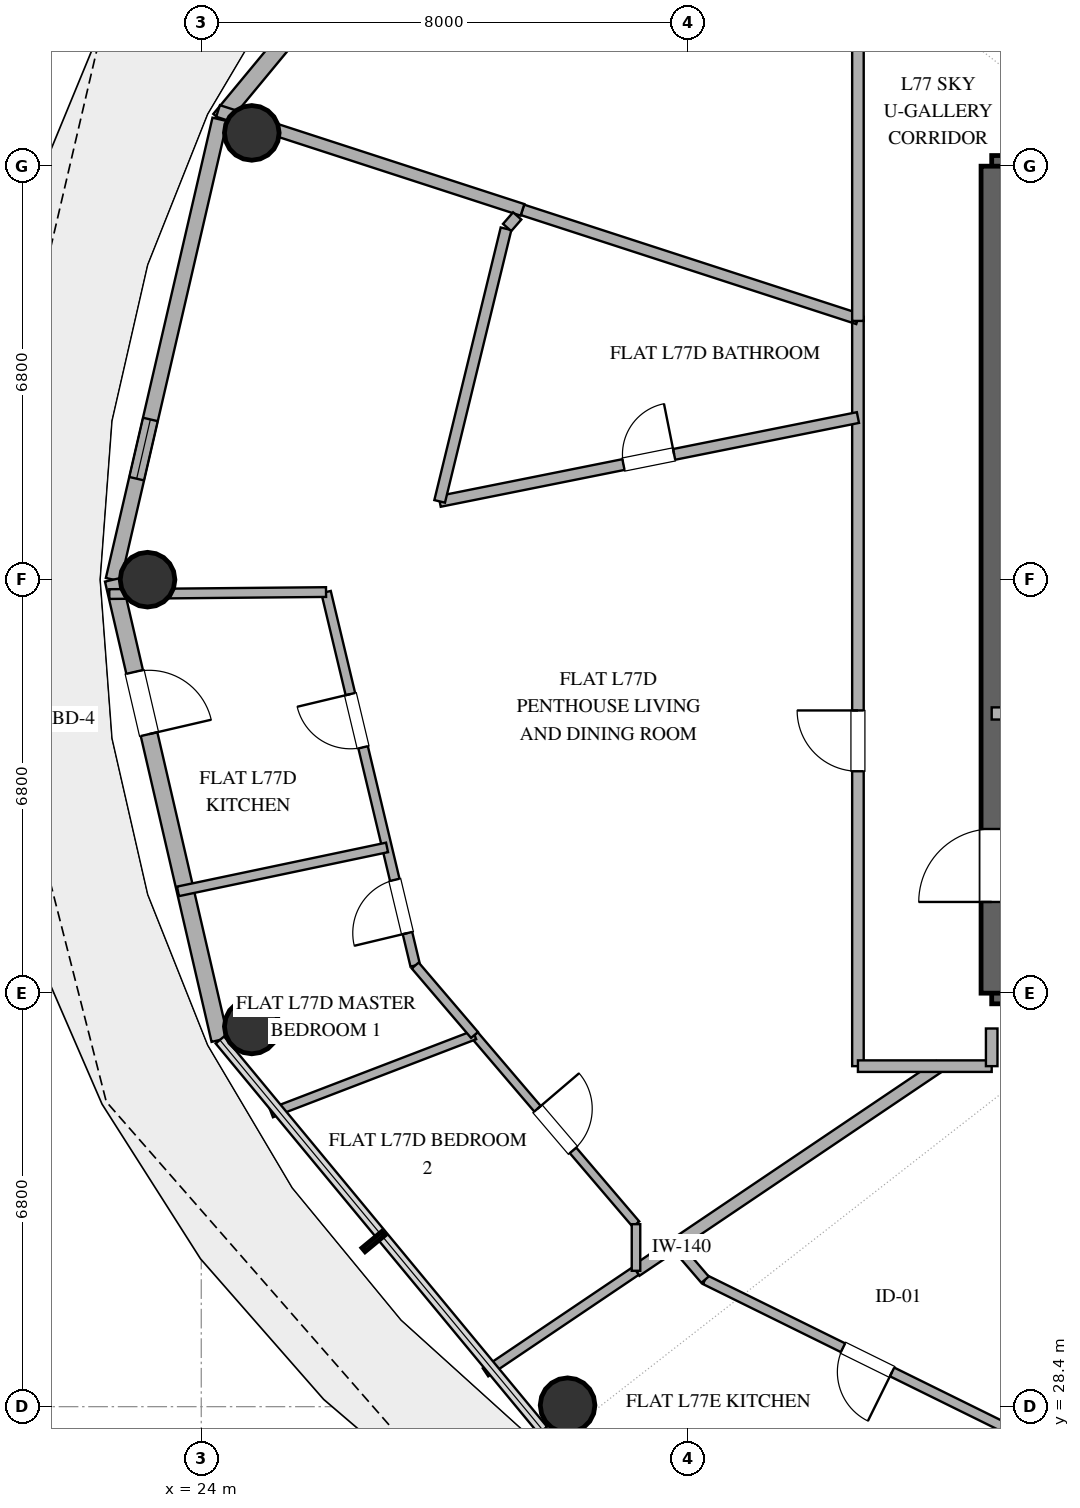
"""IFC4 building model, lengths in metres.
Left out: names, types, materials, properties, quantities, classifications, styles, units other than length and angle.
Written with IfcOpenShell. Run it as: python <this file> out.ifc"""

import sys

from ifc_helpers import new_model, si_unit, direction, frame, frame_2d, origin, origin_2d, place, context, subcontext, project, spatial, rectangle, hollow_circle, extrude, element, fill, save


model = new_model("IFC4")
c1 = context("Model", 3, precision=1e-05, world=origin(), true_north=direction((0.0, 1.0)))
c2 = subcontext(c1, "Body", "Model", "MODEL_VIEW")
j1 = project(units=[si_unit("LENGTHUNIT", "METRE"), si_unit("PLANEANGLEUNIT", "RADIAN")], contexts=[c1])
p1 = place(None, origin())
s1 = spatial("IfcSite", under=j1, at=p1, CompositionType="ELEMENT")
p2 = place(p1, origin())
s2 = spatial("IfcBuilding", under=s1, at=p2, CompositionType="ELEMENT")
p3 = place(p2, frame((0.0, 0.0, 298.2)))
s3 = spatial("IfcBuildingStorey", under=s2, at=p3, CompositionType="ELEMENT", Elevation=298.2)
for number, where, z_axis, x_axis in (
    (1, (37.0, 35.2, 0.0), (0.0, 0.0, 1.0), (1.0, 0.0, 0.0)),
    (2, (37.0, 48.8, 0.0), (0.0, 0.0, 1.0), (1.0, 0.0, 0.0)),
):
    element("IfcWall", number, at=place(p3, frame(where, z_axis=z_axis, x_axis=x_axis)), inside=s3, PredefinedType="SHEAR", context=c2, shape_type="SweptSolid", body=[
        extrude(rectangle(XDim=4.0, YDim=0.35, at=frame_2d((2.0, 0.0))), origin(), (0.0, 0.0, 1.0), 3.37),
    ])
p4 = place(p3, frame((37.0, 35.2, 0.0), z_axis=(0.0, 0.0, 1.0), x_axis=(0.0, 1.0, 0.0)))
e3 = element("IfcWall", 3, at=p4, inside=s3, PredefinedType="SHEAR", context=c2, shape_type="SweptSolid", body=[
    extrude(rectangle(XDim=13.6, YDim=0.35, at=frame_2d((6.8, 0.0))), origin(), (0.0, 0.0, 1.0), 3.37),
])
p5 = place(p4, frame((1.5, 0.0, 0.0)))
e4 = element("IfcOpeningElement", 4, at=p5, cuts=e3, PredefinedType="OPENING", context=c2, shape_type="SweptSolid", body=[
    extrude(rectangle(XDim=1.2, YDim=2.15, at=frame_2d((0.6, 1.075))), frame((0.0, 0.185, 0.0), z_axis=(0.0, -1.0, 0.0), x_axis=(1.0, 0.0, 0.0)), (0.0, 0.0, 1.0), 0.37),
])
for number, where, z_axis, x_axis in (
    (5, (24.831, 49.347, 0.0), (0.0, 0.0, 1.0), (1.0, 0.0, 0.0)),
    (6, (23.117, 42.0, 0.0), (0.0, 0.0, 1.0), (1.0, 0.0, 0.0)),
    (7, (24.831, 34.653, 0.0), (0.0, 0.0, 1.0), (1.0, 0.0, 0.0)),
    (8, (30.025, 28.424, 0.0), (0.0, 0.0, 1.0), (1.0, 0.0, 0.0)),
):
    element("IfcColumn", number, at=place(p3, frame(where, z_axis=z_axis, x_axis=x_axis)), inside=s3, PredefinedType="COLUMN", context=c2, shape_type="SweptSolid", body=[
        extrude(hollow_circle(Radius=0.45, WallThickness=0.025, at=origin_2d()), origin(), (0.0, 0.0, 1.0), 3.37),
    ])
p6 = place(p3, frame((29.617, 55.987, 0.0), z_axis=(0.0, 0.0, 1.0), x_axis=(-0.63761509934, -0.770355103243, 0.0)))
e9 = element("IfcWall", 9, at=p6, inside=s3, PredefinedType="SOLIDWALL", context=c2, shape_type="SweptSolid", body=[
    extrude(rectangle(XDim=8.33, YDim=0.28, at=frame_2d((4.165, 0.0))), origin(), (0.0, 0.0, 1.0), 3.37),
])
p7 = place(p6, frame((2.226, 0.0, 0.85)))
e10 = element("IfcOpeningElement", 10, at=p7, cuts=e9, PredefinedType="OPENING", context=c2, shape_type="SweptSolid", body=[
    extrude(rectangle(XDim=1.5, YDim=1.8, at=frame_2d((0.75, 0.9))), frame((0.0, 0.15, 0.0), z_axis=(0.0, -1.0, 0.0), x_axis=(1.0, 0.0, 0.0)), (0.0, 0.0, 1.0), 0.3),
])
p8 = place(p6, frame((4.496, 0.0, 0.85)))
e11 = element("IfcOpeningElement", 11, at=p8, cuts=e9, PredefinedType="OPENING", context=c2, shape_type="SweptSolid", body=[
    extrude(rectangle(XDim=1.5, YDim=1.8, at=frame_2d((0.75, 0.9))), frame((0.0, 0.15, 0.0), z_axis=(0.0, -1.0, 0.0), x_axis=(1.0, 0.0, 0.0)), (0.0, 0.0, 1.0), 0.3),
])
p9 = place(p3, frame((24.306, 49.57, 0.0), z_axis=(0.0, 0.0, 1.0), x_axis=(-0.225635078214, -0.974211892495, 0.0)))
e12 = element("IfcWall", 12, at=p9, inside=s3, PredefinedType="SOLIDWALL", context=c2, shape_type="SweptSolid", body=[
    extrude(rectangle(XDim=7.77, YDim=0.25, at=frame_2d((3.885, 0.0))), origin(), (0.0, 0.0, 1.0), 3.37),
])
p10 = place(p9, frame((5.065, 0.0, 1.42)))
e13 = element("IfcOpeningElement", 13, at=p10, cuts=e12, PredefinedType="OPENING", context=c2, shape_type="SweptSolid", body=[
    extrude(rectangle(XDim=1.0, YDim=1.05, at=frame_2d((0.5, 0.525))), frame((0.0, 0.135, 0.0), z_axis=(0.0, -1.0, 0.0), x_axis=(1.0, 0.0, 0.0)), (0.0, 0.0, 1.0), 0.27),
])
p11 = place(p3, frame((22.553, 42.0, 0.0), z_axis=(0.0, 0.0, 1.0), x_axis=(0.225635078214, -0.974211892495, 0.0)))
e14 = element("IfcWall", 14, at=p11, inside=s3, PredefinedType="SOLIDWALL", context=c2, shape_type="SweptSolid", body=[
    extrude(rectangle(XDim=7.77, YDim=0.28, at=frame_2d((3.885, 0.0))), origin(), (0.0, 0.0, 1.0), 3.37),
])
p12 = place(p11, frame((1.557, 0.0, 0.0)))
e15 = element("IfcOpeningElement", 15, at=p12, cuts=e14, PredefinedType="OPENING", context=c2, shape_type="SweptSolid", body=[
    extrude(rectangle(XDim=1.05, YDim=2.2, at=frame_2d((0.525, 1.1))), frame((0.0, 0.15, 0.0), z_axis=(0.0, -1.0, 0.0), x_axis=(1.0, 0.0, 0.0)), (0.0, 0.0, 1.0), 0.3),
])
p13 = place(p3, frame((29.617, 28.013, 0.0), z_axis=(0.0, 0.0, 1.0), x_axis=(0.890007394051, -0.455946091699, 0.0)))
e16 = element("IfcWall", 16, at=p13, inside=s3, PredefinedType="SOLIDWALL", context=c2, shape_type="SweptSolid", body=[
    extrude(rectangle(XDim=9.404, YDim=0.28, at=frame_2d((4.702, 0.0))), origin(), (0.0, 0.0, 1.0), 3.37),
])
p14 = place(p13, frame((2.924, 0.0, 0.85)))
e17 = element("IfcOpeningElement", 17, at=p14, cuts=e16, PredefinedType="OPENING", context=c2, shape_type="SweptSolid", body=[
    extrude(rectangle(XDim=2.1, YDim=2.2, at=frame_2d((1.05, 1.1))), frame((0.0, 0.15, 0.0), z_axis=(0.0, -1.0, 0.0), x_axis=(1.0, 0.0, 0.0)), (0.0, 0.0, 1.0), 0.3),
])
p15 = place(p13, frame((6.915, 0.0, 0.85)))
e18 = element("IfcOpeningElement", 18, at=p15, cuts=e16, PredefinedType="OPENING", context=c2, shape_type="SweptSolid", body=[
    extrude(rectangle(XDim=1.0, YDim=1.8, at=frame_2d((0.5, 0.9))), frame((0.0, 0.15, 0.0), z_axis=(0.0, -1.0, 0.0), x_axis=(1.0, 0.0, 0.0)), (0.0, 0.0, 1.0), 0.3),
])
p16 = place(p3, frame((37.0, 39.8, 0.0), z_axis=(0.0, 0.0, 1.0), x_axis=(1.0, 0.0, 0.0)))
e19 = element("IfcWall", 19, at=p16, inside=s3, PredefinedType="SOLIDWALL", context=c2, shape_type="SweptSolid", body=[
    extrude(rectangle(XDim=4.0, YDim=0.2, at=frame_2d((2.0, 0.0))), origin(), (0.0, 0.0, 1.0), 2.73),
])
p17 = place(p16, frame((1.45, 0.0, 0.0)))
e20 = element("IfcOpeningElement", 20, at=p17, cuts=e19, PredefinedType="OPENING", context=c2, shape_type="SweptSolid", body=[
    extrude(rectangle(XDim=1.1, YDim=2.15, at=frame_2d((0.55, 1.075))), frame((0.0, 0.11, 0.0), z_axis=(0.0, -1.0, 0.0), x_axis=(1.0, 0.0, 0.0)), (0.0, 0.0, 1.0), 0.22),
])
p18 = place(p3, frame((34.8, 34.0, 0.0), z_axis=(0.0, 0.0, 1.0), x_axis=(0.0, 1.0, 0.0)))
e21 = element("IfcWall", 21, at=p18, inside=s3, PredefinedType="PARTITIONING", context=c2, shape_type="SweptSolid", body=[
    extrude(rectangle(XDim=12.323, YDim=0.19, at=frame_2d((6.161, 0.0))), origin(), (0.0, 0.0, 1.0), 2.73),
])
p19 = place(p18, frame((4.849, 0.0, 0.0)))
e22 = element("IfcOpeningElement", 22, at=p19, cuts=e21, PredefinedType="OPENING", context=c2, shape_type="SweptSolid", body=[
    extrude(rectangle(XDim=1.0, YDim=2.2, at=frame_2d((0.5, 1.1))), frame((0.0, 0.105, 0.0), z_axis=(0.0, -1.0, 0.0), x_axis=(1.0, 0.0, 0.0)), (0.0, 0.0, 1.0), 0.21),
])
p20 = place(p3, frame((27.921, 43.288, 0.0), z_axis=(0.0, 0.0, 1.0), x_axis=(0.980509676699, 0.196470796559, 0.0)))
e23 = element("IfcWall", 23, at=p20, inside=s3, PredefinedType="PLUMBINGWALL", context=c2, shape_type="SweptSolid", body=[
    extrude(rectangle(XDim=7.016, YDim=0.18, at=frame_2d((3.508, 0.0))), origin(), (0.0, 0.0, 1.0), 2.73),
])
p21 = place(p20, frame((3.083, 0.0, 0.0)))
e24 = element("IfcOpeningElement", 24, at=p21, cuts=e23, PredefinedType="OPENING", context=c2, shape_type="SweptSolid", body=[
    extrude(rectangle(XDim=0.85, YDim=2.1, at=frame_2d((0.425, 1.05))), frame((0.0, 0.1, 0.0), z_axis=(0.0, -1.0, 0.0), x_axis=(1.0, 0.0, 0.0)), (0.0, 0.0, 1.0), 0.2),
])
p22 = place(p3, frame((37.63, 27.852, 0.0), z_axis=(0.0, 0.0, 1.0), x_axis=(-0.896847493932, 0.442339883605, 0.0)))
e25 = element("IfcWall", 25, at=p22, inside=s3, PredefinedType="PLUMBINGWALL", context=c2, shape_type="SweptSolid", body=[
    extrude(rectangle(XDim=5.959, YDim=0.16, at=frame_2d((2.979, 0.0))), origin(), (0.0, 0.0, 1.0), 2.73),
])
p23 = place(p22, frame((2.53, 0.0, 0.0)))
e26 = element("IfcOpeningElement", 26, at=p23, cuts=e25, PredefinedType="OPENING", context=c2, shape_type="SweptSolid", body=[
    extrude(rectangle(XDim=0.9, YDim=2.1, at=frame_2d((0.45, 1.05))), frame((0.0, 0.09, 0.0), z_axis=(0.0, -1.0, 0.0), x_axis=(1.0, 0.0, 0.0)), (0.0, 0.0, 1.0), 0.18),
])
p24 = place(p3, frame((29.283, 48.082, 0.0), z_axis=(0.0, 0.0, 1.0), x_axis=(0.951054787399, -0.309022315318, 0.0)))
e27 = element("IfcWall", 27, at=p24, inside=s3, PredefinedType="PLUMBINGWALL", context=c2, shape_type="SweptSolid", body=[
    extrude(rectangle(XDim=5.801, YDim=0.18, at=frame_2d((2.901, 0.0))), origin(), (0.0, 0.0, 1.0), 2.73),
])
p25 = place(p3, frame((24.276, 49.708, 0.0), z_axis=(0.0, 0.0, 1.0), x_axis=(0.95105383501, -0.3090252464, 0.0)))
e28 = element("IfcWall", 28, at=p25, inside=s3, PredefinedType="PARTITIONING", context=c2, shape_type="SweptSolid", body=[
    extrude(rectangle(XDim=5.264, YDim=0.2, at=frame_2d((2.632, 0.0))), origin(), (0.0, 0.0, 1.0), 2.73),
])
p26 = place(p3, frame((31.15, 30.635, 0.0), z_axis=(0.0, 0.0, 1.0), x_axis=(0.829036266652, 0.559194839546, 0.0)))
e29 = element("IfcWall", 29, at=p26, inside=s3, PredefinedType="PARTITIONING", context=c2, shape_type="SweptSolid", body=[
    extrude(rectangle(XDim=6.019, YDim=0.2, at=frame_2d((3.009, 0.0))), origin(), (0.0, 0.0, 1.0), 2.73),
])
p27 = place(p3, frame((34.8, 46.255, 0.0), z_axis=(0.0, 0.0, 1.0), x_axis=(0.0, 1.0, 0.0)))
e30 = element("IfcWall", 30, at=p27, inside=s3, PredefinedType="PARTITIONING", context=c2, shape_type="SweptSolid", body=[
    extrude(rectangle(XDim=4.645, YDim=0.19, at=frame_2d((2.322, 0.0))), origin(), (0.0, 0.0, 1.0), 2.73),
])
p28 = place(p3, frame((29.012, 47.771, 0.0), z_axis=(0.0, 0.0, 1.0), x_axis=(-0.236555437191, -0.971617993419, 0.0)))
e31 = element("IfcWall", 31, at=p28, inside=s3, PredefinedType="PLUMBINGWALL", context=c2, shape_type="SweptSolid", body=[
    extrude(rectangle(XDim=4.614, YDim=0.18, at=frame_2d((2.307, 0.0))), origin(), (0.0, 0.0, 1.0), 2.73),
])
p29 = place(p3, frame((27.519, 35.655, 0.0), z_axis=(0.0, 0.0, 1.0), x_axis=(-0.232313993087, 0.97264084256, 0.0)))
e32 = element("IfcWall", 32, at=p29, inside=s3, PredefinedType="PLUMBINGWALL", context=c2, shape_type="SweptSolid", body=[
    extrude(rectangle(XDim=6.314, YDim=0.16, at=frame_2d((3.157, 0.0))), origin(), (0.0, 0.0, 1.0), 2.73),
])
p30 = place(p29, frame((3.689, 0.0, 0.0)))
e33 = element("IfcOpeningElement", 33, at=p30, cuts=e32, PredefinedType="OPENING", context=c2, shape_type="SweptSolid", body=[
    extrude(rectangle(XDim=0.9, YDim=2.1, at=frame_2d((0.45, 1.05))), frame((0.0, 0.09, 0.0), z_axis=(0.0, -1.0, 0.0), x_axis=(1.0, 0.0, 0.0)), (0.0, 0.0, 1.0), 0.18),
])
p31 = place(p29, frame((0.548, 0.0, 0.0)))
e34 = element("IfcOpeningElement", 34, at=p31, cuts=e32, PredefinedType="OPENING", context=c2, shape_type="SweptSolid", body=[
    extrude(rectangle(XDim=0.9, YDim=2.1, at=frame_2d((0.45, 1.05))), frame((0.0, 0.09, 0.0), z_axis=(0.0, -1.0, 0.0), x_axis=(1.0, 0.0, 0.0)), (0.0, 0.0, 1.0), 0.18),
])
p32 = place(p3, frame((28.494, 34.512, 0.0), z_axis=(0.0, 0.0, 1.0), x_axis=(0.649192484668, -0.760624163336, 0.0)))
e35 = element("IfcWall", 35, at=p32, inside=s3, PredefinedType="PARTITIONING", context=c2, shape_type="SweptSolid", body=[
    extrude(rectangle(XDim=4.091, YDim=0.14, at=frame_2d((2.045, 0.0))), origin(), (0.0, 0.0, 1.0), 2.73),
])
p33 = place(p32, frame((1.595, 0.0, 0.0)))
e36 = element("IfcOpeningElement", 36, at=p33, cuts=e35, PredefinedType="OPENING", context=c2, shape_type="SweptSolid", body=[
    extrude(rectangle(XDim=0.9, YDim=2.1, at=frame_2d((0.45, 1.05))), frame((0.0, 0.08, 0.0), z_axis=(0.0, -1.0, 0.0), x_axis=(1.0, 0.0, 0.0)), (0.0, 0.0, 1.0), 0.16),
])
p34 = place(p3, frame((28.494, 34.512, 0.0), z_axis=(0.0, 0.0, 1.0), x_axis=(-0.933587977353, -0.358348278274, 0.0)))
e37 = element("IfcWall", 37, at=p34, inside=s3, PredefinedType="PARTITIONING", context=c2, shape_type="SweptSolid", body=[
    extrude(rectangle(XDim=3.58, YDim=0.15, at=frame_2d((1.79, 0.0))), origin(), (0.0, 0.0, 1.0), 2.73),
])
p35 = place(p3, frame((26.052, 41.796, 0.0), z_axis=(0.0, 0.0, 1.0), x_axis=(-0.999957259018, -0.009245546878, 0.0)))
e38 = element("IfcWall", 38, at=p35, inside=s3, PredefinedType="PLUMBINGWALL", context=c2, shape_type="SweptSolid", body=[
    extrude(rectangle(XDim=3.565, YDim=0.16, at=frame_2d((1.782, 0.0))), origin(), (0.0, 0.0, 1.0), 2.73),
])
p36 = place(p3, frame((27.055, 37.597, 0.0), z_axis=(0.0, 0.0, 1.0), x_axis=(-0.978617562331, -0.205688275545, 0.0)))
e39 = element("IfcWall", 39, at=p36, inside=s3, PredefinedType="PLUMBINGWALL", context=c2, shape_type="SweptSolid", body=[
    extrude(rectangle(XDim=3.513, YDim=0.16, at=frame_2d((1.757, 0.0))), origin(), (0.0, 0.0, 1.0), 2.73),
])
p37 = place(p3, frame((31.15, 30.635, 0.0), z_axis=(0.0, 0.0, 1.0), x_axis=(-0.82904391661, -0.559183497907, 0.0)))
e40 = element("IfcWall", 40, at=p37, inside=s3, PredefinedType="PLUMBINGWALL", context=c2, shape_type="SweptSolid", body=[
    extrude(rectangle(XDim=2.986, YDim=0.16, at=frame_2d((1.493, 0.0))), origin(), (0.0, 0.0, 1.0), 2.73),
])
p38 = place(p3, frame((27.519, 35.655, 0.0), z_axis=(0.0, 0.0, 1.0), x_axis=(0.649250915383, -0.760574288859, 0.0)))
e41 = element("IfcWall", 41, at=p38, inside=s3, PredefinedType="PARTITIONING", context=c2, shape_type="SweptSolid", body=[
    extrude(rectangle(XDim=1.502, YDim=0.15, at=frame_2d((0.751, 0.0))), origin(), (0.0, 0.0, 1.0), 2.73),
])
p39 = place(p3, frame((37.0, 34.0, 0.0), z_axis=(0.0, 0.0, 1.0), x_axis=(-1.0, 0.0, 0.0)))
e42 = element("IfcWall", 42, at=p39, inside=s3, PredefinedType="PARTITIONING", context=c2, shape_type="SweptSolid", body=[
    extrude(rectangle(XDim=2.2, YDim=0.19, at=frame_2d((1.1, 0.0))), origin(), (0.0, 0.0, 1.0), 2.73),
])
p40 = place(p3, frame((31.15, 31.401, 0.0), z_axis=(0.0, 0.0, 1.0), x_axis=(0.0, -1.0, 0.0)))
e43 = element("IfcWall", 43, at=p40, inside=s3, PredefinedType="PARTITIONING", context=c2, shape_type="SweptSolid", body=[
    extrude(rectangle(XDim=0.767, YDim=0.14, at=frame_2d((0.383, 0.0))), origin(), (0.0, 0.0, 1.0), 2.73),
])
p41 = place(p3, frame((32.286, 30.488, 0.0), z_axis=(0.0, 0.0, 1.0), x_axis=(-0.651714881855, 0.758464048435, 0.0)))
e44 = element("IfcWall", 44, at=p41, inside=s3, PredefinedType="PLUMBINGWALL", context=c2, shape_type="SweptSolid", body=[
    extrude(rectangle(XDim=0.761, YDim=0.16, at=frame_2d((0.381, 0.0))), origin(), (0.0, 0.0, 1.0), 2.73),
])
p42 = place(p3, frame((37.0, 34.619, 0.0), z_axis=(0.0, 0.0, 1.0), x_axis=(0.0, -1.0, 0.0)))
e45 = element("IfcWall", 45, at=p42, inside=s3, PredefinedType="PARTITIONING", context=c2, shape_type="SweptSolid", body=[
    extrude(rectangle(XDim=0.619, YDim=0.19, at=frame_2d((0.31, 0.0))), origin(), (0.0, 0.0, 1.0), 2.73),
])
p43 = place(p3, frame((29.196, 47.982, 0.0), z_axis=(0.0, 0.0, 1.0), x_axis=(-0.656442741053, -0.754375853086, 0.0)))
e46 = element("IfcWall", 46, at=p43, inside=s3, PredefinedType="PLUMBINGWALL", context=c2, shape_type="SweptSolid", body=[
    extrude(rectangle(XDim=0.252, YDim=0.18, at=frame_2d((0.126, 0.0))), origin(), (0.0, 0.0, 1.0), 2.73),
])
p44 = place(p12, origin())
e47 = element("IfcDoor", 47, at=p44, inside=s3, OperationType="SINGLE_SWING_RIGHT", PredefinedType="DOOR", context=c2, shape_type="SweptSolid", body=[
    extrude(rectangle(XDim=1.05, YDim=2.2, at=frame_2d((0.525, 1.1))), frame((0.0, 0.025, 0.0), z_axis=(0.0, -1.0, 0.0), x_axis=(1.0, 0.0, 0.0)), (0.0, 0.0, 1.0), 0.05),
])
fill(e15, e47)
p45 = place(p10, origin())
e48 = element("IfcWindow", 48, at=p45, inside=s3, PartitioningType="SINGLE_PANEL", PredefinedType="WINDOW", context=c2, shape_type="SweptSolid", body=[
    extrude(rectangle(XDim=1.0, YDim=1.05, at=frame_2d((0.5, 0.525))), frame((0.0, 0.03, 0.0), z_axis=(0.0, -1.0, 0.0), x_axis=(1.0, 0.0, 0.0)), (0.0, 0.0, 1.0), 0.06),
])
fill(e13, e48)
p46 = place(p5, origin())
e49 = element("IfcDoor", 49, at=p46, inside=s3, OperationType="SINGLE_SWING_LEFT", PredefinedType="DOOR", context=c2, shape_type="SweptSolid", body=[
    extrude(rectangle(XDim=1.2, YDim=2.15, at=frame_2d((0.6, 1.075))), frame((0.0, 0.025, 0.0), z_axis=(0.0, -1.0, 0.0), x_axis=(1.0, 0.0, 0.0)), (0.0, 0.0, 1.0), 0.05),
])
fill(e4, e49)
p47 = place(p19, origin())
e50 = element("IfcDoor", 50, at=p47, inside=s3, OperationType="SINGLE_SWING_RIGHT", PredefinedType="DOOR", context=c2, shape_type="SweptSolid", body=[
    extrude(rectangle(XDim=1.0, YDim=2.2, at=frame_2d((0.5, 1.1))), frame((0.0, 0.025, 0.0), z_axis=(0.0, -1.0, 0.0), x_axis=(1.0, 0.0, 0.0)), (0.0, 0.0, 1.0), 0.05),
])
fill(e22, e50)
p48 = place(p21, origin())
e51 = element("IfcDoor", 51, at=p48, inside=s3, OperationType="SINGLE_SWING_RIGHT", PredefinedType="DOOR", context=c2, shape_type="SweptSolid", body=[
    extrude(rectangle(XDim=0.85, YDim=2.1, at=frame_2d((0.425, 1.05))), frame((0.0, 0.025, 0.0), z_axis=(0.0, -1.0, 0.0), x_axis=(1.0, 0.0, 0.0)), (0.0, 0.0, 1.0), 0.05),
])
fill(e24, e51)
p49 = place(p23, origin())
e52 = element("IfcDoor", 52, at=p49, inside=s3, OperationType="SINGLE_SWING_LEFT", PredefinedType="DOOR", context=c2, shape_type="SweptSolid", body=[
    extrude(rectangle(XDim=0.9, YDim=2.1, at=frame_2d((0.45, 1.05))), frame((0.0, 0.025, 0.0), z_axis=(0.0, -1.0, 0.0), x_axis=(1.0, 0.0, 0.0)), (0.0, 0.0, 1.0), 0.05),
])
fill(e26, e52)
p50 = place(p30, origin())
e53 = element("IfcDoor", 53, at=p50, inside=s3, OperationType="SINGLE_SWING_RIGHT", PredefinedType="DOOR", context=c2, shape_type="SweptSolid", body=[
    extrude(rectangle(XDim=0.9, YDim=2.1, at=frame_2d((0.45, 1.05))), frame((0.0, 0.025, 0.0), z_axis=(0.0, -1.0, 0.0), x_axis=(1.0, 0.0, 0.0)), (0.0, 0.0, 1.0), 0.05),
])
fill(e33, e53)
p51 = place(p31, origin())
e54 = element("IfcDoor", 54, at=p51, inside=s3, OperationType="SINGLE_SWING_LEFT", PredefinedType="DOOR", context=c2, shape_type="SweptSolid", body=[
    extrude(rectangle(XDim=0.9, YDim=2.1, at=frame_2d((0.45, 1.05))), frame((0.0, 0.025, 0.0), z_axis=(0.0, -1.0, 0.0), x_axis=(1.0, 0.0, 0.0)), (0.0, 0.0, 1.0), 0.05),
])
fill(e34, e54)
p52 = place(p33, origin())
e55 = element("IfcDoor", 55, at=p52, inside=s3, OperationType="SINGLE_SWING_LEFT", PredefinedType="DOOR", context=c2, shape_type="SweptSolid", body=[
    extrude(rectangle(XDim=0.9, YDim=2.1, at=frame_2d((0.45, 1.05))), frame((0.0, 0.025, 0.0), z_axis=(0.0, -1.0, 0.0), x_axis=(1.0, 0.0, 0.0)), (0.0, 0.0, 1.0), 0.05),
])
fill(e36, e55)
save(model, sys.argv[1])
